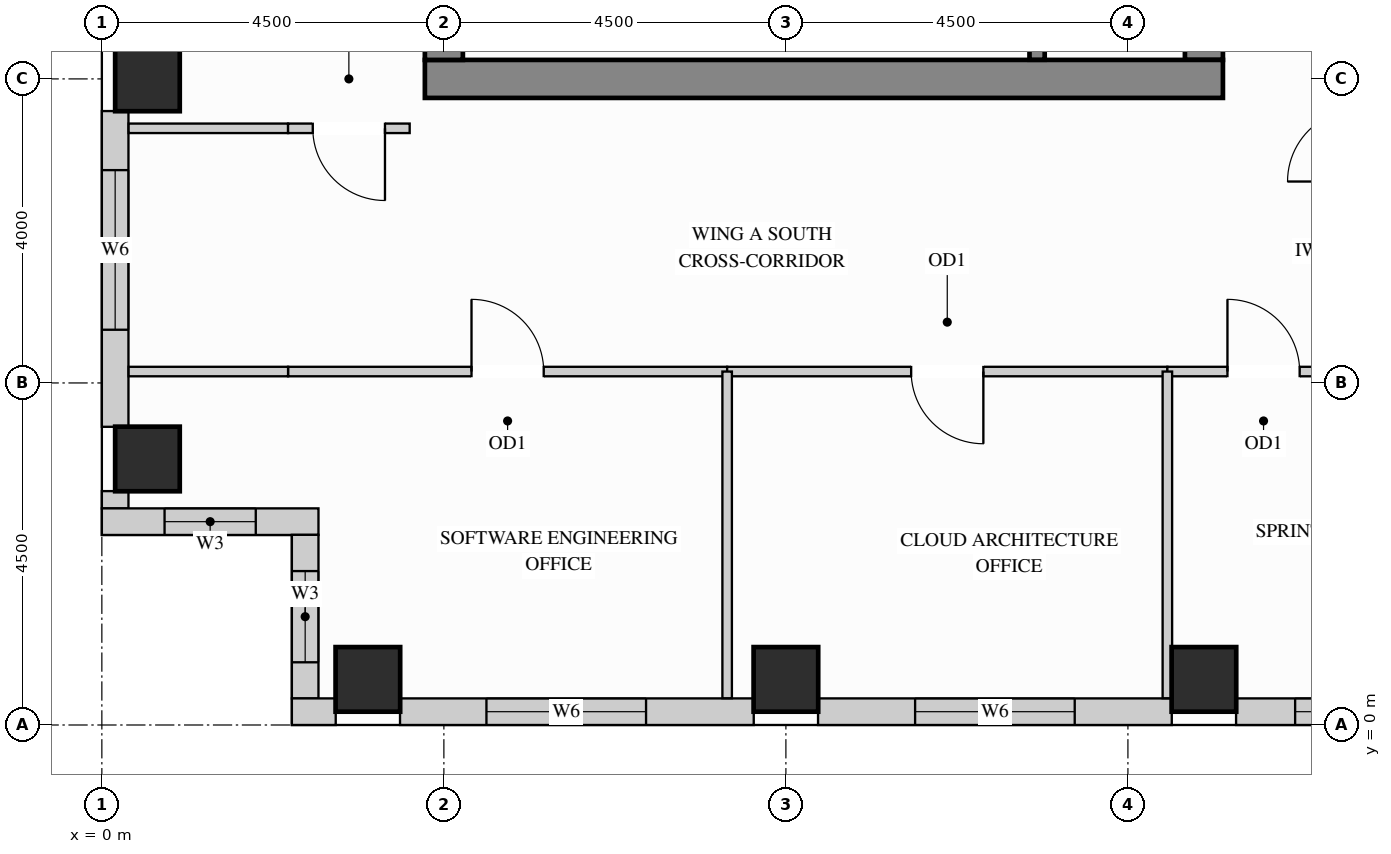
"""IFC4 building model, lengths in metres.
Left out: names, types, materials, properties, quantities, classifications, styles, units other than length and angle.
Written with IfcOpenShell. Run it as: python <this file> out.ifc"""

import sys

from ifc_helpers import new_model, si_unit, direction, frame, frame_2d, origin, origin_2d, place, context, subcontext, project, spatial, rectangle, extrude, source, transform, mapped, element, fill, save


model = new_model("IFC4")
c1 = context("Model", 3, precision=1e-05, world=origin(), true_north=direction((0.0, 1.0)))
c2 = subcontext(c1, "Body", "Model", "MODEL_VIEW")
j1 = project(units=[si_unit("LENGTHUNIT", "METRE"), si_unit("PLANEANGLEUNIT", "RADIAN")], contexts=[c1])
p1 = place(None, origin())
s1 = spatial("IfcSite", under=j1, at=p1, CompositionType="ELEMENT")
p2 = place(p1, origin())
s2 = spatial("IfcBuilding", under=s1, at=p2, CompositionType="ELEMENT")
p3 = place(p2, frame((0.0, 0.0, 255.6)))
s3 = spatial("IfcBuildingStorey", under=s2, at=p3, CompositionType="ELEMENT", Elevation=255.6)
m1 = source(origin(), c2, "Body", "SweptSolid", [
    extrude(rectangle(XDim=0.85, YDim=0.85, at=origin_2d()), origin(), (0.0, 0.0, 1.0), 3.4),
])
for number, where, z_axis, x_axis in (
    (1, (14.5, 0.6, 0.0), (0.0, 0.0, 1.0), (1.0, 0.0, 0.0)),
    (2, (3.5, 0.6, 0.0), (0.0, 0.0, 1.0), (1.0, 0.0, 0.0)),
    (3, (9.0, 0.6, 0.0), (0.0, 0.0, 1.0), (1.0, 0.0, 0.0)),
    (4, (0.6, 3.5, 0.0), (0.0, 0.0, 1.0), (1.0, 0.0, 0.0)),
    (5, (0.6, 8.5, 0.0), (0.0, 0.0, 1.0), (1.0, 0.0, 0.0)),
):
    element("IfcColumn", number, at=place(p3, frame(where, z_axis=z_axis, x_axis=x_axis)), inside=s3, PredefinedType="COLUMN", context=c2, shape_type="MappedRepresentation", body=[
        mapped(m1, transform((0.0, 0.0, 0.0), x_axis=(1.0, 0.0, 0.0), y_axis=(0.0, 1.0, 0.0), z_axis=(0.0, 0.0, 1.0))),
    ])
m2 = source(origin(), c2, "Body", "SweptSolid", [
    extrude(rectangle(XDim=10.07, YDim=0.5, at=frame_2d((5.035, 0.0))), origin(), (0.0, 0.0, 1.0), 3.4),
])
p4 = place(p3, frame((14.5, 8.75, 0.0), z_axis=(0.0, 0.0, 1.0), x_axis=(0.0, 1.0, 0.0)))
e6 = element("IfcWall", 6, at=p4, inside=s3, PredefinedType="SHEAR", context=c2, shape_type="MappedRepresentation", body=[
    mapped(m2, transform((0.0, 0.0, 0.0), x_axis=(1.0, 0.0, 0.0), y_axis=(0.0, 1.0, 0.0), z_axis=(0.0, 0.0, 1.0))),
])
m3 = source(origin(), c2, "Body", "SweptSolid", [
    extrude(rectangle(XDim=10.5, YDim=0.5, at=frame_2d((5.25, 0.0))), origin(), (0.0, 0.0, 1.0), 3.4),
])
p5 = place(p3, frame((4.25, 8.5, 0.0), z_axis=(0.0, 0.0, 1.0), x_axis=(1.0, 0.0, 0.0)))
e7 = element("IfcWall", 7, at=p5, inside=s3, PredefinedType="SHEAR", context=c2, shape_type="MappedRepresentation", body=[
    mapped(m3, transform((0.0, 0.0, 0.0), x_axis=(1.0, 0.0, 0.0), y_axis=(0.0, 1.0, 0.0), z_axis=(0.0, 0.0, 1.0))),
])
m4 = source(origin(), c2, "Body", "SweptSolid", [
    extrude(rectangle(XDim=20.5, YDim=0.5, at=frame_2d((10.25, 0.0))), origin(), (0.0, 0.0, 1.0), 3.4),
])
p6 = place(p3, frame((4.5, 8.75, 0.0), z_axis=(0.0, 0.0, 1.0), x_axis=(0.0, 1.0, 0.0)))
e8 = element("IfcWall", 8, at=p6, inside=s3, PredefinedType="SHEAR", context=c2, shape_type="MappedRepresentation", body=[
    mapped(m4, transform((0.0, 0.0, 0.0), x_axis=(1.0, 0.0, 0.0), y_axis=(0.0, 1.0, 0.0), z_axis=(0.0, 0.0, 1.0))),
])
p7 = place(p3, frame((0.175, 8.077, 0.0), z_axis=(0.0, 0.0, 1.0), x_axis=(0.0, -1.0, 0.0)))
e9 = element("IfcWall", 9, at=p7, inside=s3, PredefinedType="SOLIDWALL", context=c2, shape_type="SweptSolid", body=[
    extrude(rectangle(XDim=4.154, YDim=0.35, at=frame_2d((2.077, 0.0))), origin(), (0.0, 0.0, 1.0), 3.385),
])
p8 = place(p7, frame((0.777, 0.0, 0.78)))
e10 = element("IfcOpeningElement", 10, at=p8, cuts=e9, PredefinedType="OPENING", context=c2, shape_type="SweptSolid", body=[
    extrude(rectangle(XDim=2.1, YDim=2.25, at=frame_2d((1.05, 1.125))), frame((0.0, 0.185, 0.0), z_axis=(0.0, -1.0, 0.0), x_axis=(1.0, 0.0, 0.0)), (0.0, 0.0, 1.0), 0.37),
])
m5 = source(origin(), c2, "Body", "SweptSolid", [
    extrude(rectangle(XDim=0.229, YDim=0.35, at=frame_2d((0.115, 0.0))), origin(), (0.0, 0.0, 1.0), 3.385),
])
p9 = place(p3, frame((0.175, 3.077, 0.0), z_axis=(0.0, 0.0, 1.0), x_axis=(0.0, -1.0, 0.0)))
e11 = element("IfcWall", 11, at=p9, inside=s3, PredefinedType="SOLIDWALL", context=c2, shape_type="MappedRepresentation", body=[
    mapped(m5, transform((0.0, 0.0, 0.0), x_axis=(1.0, 0.0, 0.0), y_axis=(0.0, 1.0, 0.0), z_axis=(0.0, 0.0, 1.0))),
])
p10 = place(p3, frame((0.0, 2.675, 0.0), z_axis=(0.0, 0.0, 1.0), x_axis=(1.0, 0.0, 0.0)))
e12 = element("IfcWall", 12, at=p10, inside=s3, PredefinedType="SOLIDWALL", context=c2, shape_type="SweptSolid", body=[
    extrude(rectangle(XDim=2.85, YDim=0.35, at=frame_2d((1.425, 0.0))), origin(), (0.0, 0.0, 1.0), 3.385),
])
p11 = place(p10, frame((0.825, 0.0, 0.78)))
e13 = element("IfcOpeningElement", 13, at=p11, cuts=e12, PredefinedType="OPENING", context=c2, shape_type="SweptSolid", body=[
    extrude(rectangle(XDim=1.2, YDim=2.25, at=frame_2d((0.6, 1.125))), frame((0.0, 0.185, 0.0), z_axis=(0.0, -1.0, 0.0), x_axis=(1.0, 0.0, 0.0)), (0.0, 0.0, 1.0), 0.37),
])
p12 = place(p3, frame((2.675, 2.502, 0.0), z_axis=(0.0, 0.0, 1.0), x_axis=(0.0, -1.0, 0.0)))
e14 = element("IfcWall", 14, at=p12, inside=s3, PredefinedType="SOLIDWALL", context=c2, shape_type="SweptSolid", body=[
    extrude(rectangle(XDim=2.154, YDim=0.35, at=frame_2d((1.077, 0.0))), origin(), (0.0, 0.0, 1.0), 3.385),
])
p13 = place(p12, frame((0.477, 0.0, 0.78)))
e15 = element("IfcOpeningElement", 15, at=p13, cuts=e14, PredefinedType="OPENING", context=c2, shape_type="SweptSolid", body=[
    extrude(rectangle(XDim=1.2, YDim=2.25, at=frame_2d((0.6, 1.125))), frame((0.0, 0.185, 0.0), z_axis=(0.0, -1.0, 0.0), x_axis=(1.0, 0.0, 0.0)), (0.0, 0.0, 1.0), 0.37),
])
m6 = source(origin(), c2, "Body", "SweptSolid", [
    extrude(rectangle(XDim=0.577, YDim=0.35, at=frame_2d((0.289, 0.0))), origin(), (0.0, 0.0, 1.0), 3.385),
])
p14 = place(p3, frame((2.5, 0.175, 0.0), z_axis=(0.0, 0.0, 1.0), x_axis=(1.0, 0.0, 0.0)))
e16 = element("IfcWall", 16, at=p14, inside=s3, PredefinedType="SOLIDWALL", context=c2, shape_type="MappedRepresentation", body=[
    mapped(m6, transform((0.0, 0.0, 0.0), x_axis=(1.0, 0.0, 0.0), y_axis=(0.0, 1.0, 0.0), z_axis=(0.0, 0.0, 1.0))),
])
p15 = place(p3, frame((3.923, 0.175, 0.0), z_axis=(0.0, 0.0, 1.0), x_axis=(1.0, 0.0, 0.0)))
e17 = element("IfcWall", 17, at=p15, inside=s3, PredefinedType="SOLIDWALL", context=c2, shape_type="SweptSolid", body=[
    extrude(rectangle(XDim=4.654, YDim=0.35, at=frame_2d((2.327, 0.0))), origin(), (0.0, 0.0, 1.0), 3.385),
])
p16 = place(p15, frame((1.137, 0.0, 0.78)))
e18 = element("IfcOpeningElement", 18, at=p16, cuts=e17, PredefinedType="OPENING", context=c2, shape_type="SweptSolid", body=[
    extrude(rectangle(XDim=2.1, YDim=2.25, at=frame_2d((1.05, 1.125))), frame((0.0, 0.185, 0.0), z_axis=(0.0, -1.0, 0.0), x_axis=(1.0, 0.0, 0.0)), (0.0, 0.0, 1.0), 0.37),
])
p17 = place(p3, frame((9.423, 0.175, 0.0), z_axis=(0.0, 0.0, 1.0), x_axis=(1.0, 0.0, 0.0)))
e19 = element("IfcWall", 19, at=p17, inside=s3, PredefinedType="SOLIDWALL", context=c2, shape_type="SweptSolid", body=[
    extrude(rectangle(XDim=4.654, YDim=0.35, at=frame_2d((2.327, 0.0))), origin(), (0.0, 0.0, 1.0), 3.385),
])
p18 = place(p17, frame((1.277, 0.0, 0.78)))
e20 = element("IfcOpeningElement", 20, at=p18, cuts=e19, PredefinedType="OPENING", context=c2, shape_type="SweptSolid", body=[
    extrude(rectangle(XDim=2.1, YDim=2.25, at=frame_2d((1.05, 1.125))), frame((0.0, 0.185, 0.0), z_axis=(0.0, -1.0, 0.0), x_axis=(1.0, 0.0, 0.0)), (0.0, 0.0, 1.0), 0.37),
])
p19 = place(p3, frame((14.923, 0.175, 0.0), z_axis=(0.0, 0.0, 1.0), x_axis=(1.0, 0.0, 0.0)))
e21 = element("IfcWall", 21, at=p19, inside=s3, PredefinedType="SOLIDWALL", context=c2, shape_type="SweptSolid", body=[
    extrude(rectangle(XDim=3.654, YDim=0.35, at=frame_2d((1.827, 0.0))), origin(), (0.0, 0.0, 1.0), 3.385),
])
p20 = place(p19, frame((0.777, 0.0, 0.78)))
e22 = element("IfcOpeningElement", 22, at=p20, cuts=e21, PredefinedType="OPENING", context=c2, shape_type="SweptSolid", body=[
    extrude(rectangle(XDim=2.1, YDim=2.25, at=frame_2d((1.05, 1.125))), frame((0.0, 0.185, 0.0), z_axis=(0.0, -1.0, 0.0), x_axis=(1.0, 0.0, 0.0)), (0.0, 0.0, 1.0), 0.37),
])
m7 = source(origin(), c2, "Body", "SweptSolid", [
    extrude(rectangle(XDim=2.098, YDim=0.125, at=frame_2d((1.049, 0.0))), origin(), (0.0, 0.0, 1.0), 3.385),
])
p21 = place(p3, frame((0.352, 7.85, 0.0), z_axis=(0.0, 0.0, 1.0), x_axis=(1.0, 0.0, 0.0)))
e23 = element("IfcWall", 23, at=p21, inside=s3, PredefinedType="PARTITIONING", context=c2, shape_type="MappedRepresentation", body=[
    mapped(m7, transform((0.0, 0.0, 0.0), x_axis=(1.0, 0.0, 0.0), y_axis=(0.0, 1.0, 0.0), z_axis=(0.0, 0.0, 1.0))),
])
p22 = place(p3, frame((2.45, 7.85, 0.0), z_axis=(0.0, 0.0, 1.0), x_axis=(1.0, 0.0, 0.0)))
e24 = element("IfcWall", 24, at=p22, inside=s3, PredefinedType="PARTITIONING", context=c2, shape_type="SweptSolid", body=[
    extrude(rectangle(XDim=1.6, YDim=0.125, at=frame_2d((0.8, 0.0))), origin(), (0.0, 0.0, 1.0), 3.385),
])
p23 = place(p22, frame((0.325, 0.0, 0.0)))
e25 = element("IfcOpeningElement", 25, at=p23, cuts=e24, PredefinedType="OPENING", context=c2, shape_type="SweptSolid", body=[
    extrude(rectangle(XDim=0.95, YDim=2.15, at=frame_2d((0.475, 1.075))), frame((0.0, 0.073, 0.0), z_axis=(0.0, -1.0, 0.0), x_axis=(1.0, 0.0, 0.0)), (0.0, 0.0, 1.0), 0.145),
])
p24 = place(p3, frame((2.45, 4.65, 0.0), z_axis=(0.0, 0.0, 1.0), x_axis=(1.0, 0.0, 0.0)))
e26 = element("IfcWall", 26, at=p24, inside=s3, PredefinedType="PARTITIONING", context=c2, shape_type="SweptSolid", body=[
    extrude(rectangle(XDim=5.777, YDim=0.125, at=frame_2d((2.889, 0.0))), origin(), (0.0, 0.0, 1.0), 2.848),
])
p25 = place(p24, frame((2.414, 0.0, 0.0)))
e27 = element("IfcOpeningElement", 27, at=p25, cuts=e26, PredefinedType="OPENING", context=c2, shape_type="SweptSolid", body=[
    extrude(rectangle(XDim=0.95, YDim=2.15, at=frame_2d((0.475, 1.075))), frame((0.0, 0.073, 0.0), z_axis=(0.0, -1.0, 0.0), x_axis=(1.0, 0.0, 0.0)), (0.0, 0.0, 1.0), 0.145),
])
p26 = place(p3, frame((8.227, 4.65, 0.0), z_axis=(0.0, 0.0, 1.0), x_axis=(1.0, 0.0, 0.0)))
e28 = element("IfcWall", 28, at=p26, inside=s3, PredefinedType="PARTITIONING", context=c2, shape_type="SweptSolid", body=[
    extrude(rectangle(XDim=5.792, YDim=0.125, at=frame_2d((2.896, 0.0))), origin(), (0.0, 0.0, 1.0), 2.848),
])
p27 = place(p26, frame((2.421, 0.0, 0.0)))
e29 = element("IfcOpeningElement", 29, at=p27, cuts=e28, PredefinedType="OPENING", context=c2, shape_type="SweptSolid", body=[
    extrude(rectangle(XDim=0.95, YDim=2.15, at=frame_2d((0.475, 1.075))), frame((0.0, 0.073, 0.0), z_axis=(0.0, -1.0, 0.0), x_axis=(1.0, 0.0, 0.0)), (0.0, 0.0, 1.0), 0.145),
])
p28 = place(p3, frame((14.019, 4.65, 0.0), z_axis=(0.0, 0.0, 1.0), x_axis=(1.0, 0.0, 0.0)))
e30 = element("IfcWall", 30, at=p28, inside=s3, PredefinedType="PARTITIONING", context=c2, shape_type="SweptSolid", body=[
    extrude(rectangle(XDim=2.531, YDim=0.125, at=frame_2d((1.266, 0.0))), origin(), (0.0, 0.0, 1.0), 2.848),
])
p29 = place(p28, frame((0.791, 0.0, 0.0)))
e31 = element("IfcOpeningElement", 31, at=p29, cuts=e30, PredefinedType="OPENING", context=c2, shape_type="SweptSolid", body=[
    extrude(rectangle(XDim=0.95, YDim=2.15, at=frame_2d((0.475, 1.075))), frame((0.0, 0.073, 0.0), z_axis=(0.0, -1.0, 0.0), x_axis=(1.0, 0.0, 0.0)), (0.0, 0.0, 1.0), 0.145),
])
m8 = source(origin(), c2, "Body", "SweptSolid", [
    extrude(rectangle(XDim=2.098, YDim=0.125, at=frame_2d((1.049, 0.0))), origin(), (0.0, 0.0, 1.0), 2.848),
])
p30 = place(p3, frame((0.352, 4.65, 0.0), z_axis=(0.0, 0.0, 1.0), x_axis=(1.0, 0.0, 0.0)))
e32 = element("IfcWall", 32, at=p30, inside=s3, PredefinedType="PARTITIONING", context=c2, shape_type="MappedRepresentation", body=[
    mapped(m8, transform((0.0, 0.0, 0.0), x_axis=(1.0, 0.0, 0.0), y_axis=(0.0, 1.0, 0.0), z_axis=(0.0, 0.0, 1.0))),
])
m9 = source(origin(), c2, "Body", "SweptSolid", [
    extrude(rectangle(XDim=4.298, YDim=0.125, at=frame_2d((2.149, 0.0))), origin(), (0.0, 0.0, 1.0), 3.385),
])
for number, where, z_axis, x_axis in (
    (33, (8.227, 0.352, 0.0), (0.0, 0.0, 1.0), (0.0, 1.0, 0.0)),
    (34, (14.019, 0.352, 0.0), (0.0, 0.0, 1.0), (0.0, 1.0, 0.0)),
):
    element("IfcWall", number, at=place(p3, frame(where, z_axis=z_axis, x_axis=x_axis)), inside=s3, PredefinedType="PARTITIONING", context=c2, shape_type="MappedRepresentation", body=[
        mapped(m9, transform((0.0, 0.0, 0.0), x_axis=(1.0, 0.0, 0.0), y_axis=(0.0, 1.0, 0.0), z_axis=(0.0, 0.0, 1.0))),
    ])
m10 = source(origin(), c2, "Body", "SweptSolid", [
    extrude(rectangle(XDim=3.803, YDim=0.2, at=frame_2d((1.901, 0.0))), origin(), (0.0, 0.0, 1.0), 3.4),
])
p31 = place(p3, frame((12.305, 8.752, 0.0), z_axis=(0.0, 0.0, 1.0), x_axis=(0.0, 1.0, 0.0)))
e35 = element("IfcWall", 35, at=p31, inside=s3, PredefinedType="SHEAR", context=c2, shape_type="MappedRepresentation", body=[
    mapped(m10, transform((0.0, 0.0, 0.0), x_axis=(1.0, 0.0, 0.0), y_axis=(0.0, 1.0, 0.0), z_axis=(0.0, 0.0, 1.0))),
])
m11 = source(origin(), c2, "Body", "SweptSolid", [
    extrude(rectangle(XDim=0.95, YDim=2.15, at=frame_2d((0.475, 1.075))), frame((0.0, 0.025, 0.0), z_axis=(0.0, -1.0, 0.0), x_axis=(1.0, 0.0, 0.0)), (0.0, 0.0, 1.0), 0.05),
])
p32 = place(p25, origin())
e36 = element("IfcDoor", 36, at=p32, inside=s3, OperationType="SINGLE_SWING_LEFT", PredefinedType="DOOR", context=c2, shape_type="MappedRepresentation", body=[
    mapped(m11, transform((0.0, 0.0, 0.0), x_axis=(1.0, 0.0, 0.0), y_axis=(0.0, 1.0, 0.0), z_axis=(0.0, 0.0, 1.0))),
])
fill(e27, e36)
p33 = place(p27, origin())
e37 = element("IfcDoor", 37, at=p33, inside=s3, OperationType="SINGLE_SWING_RIGHT", PredefinedType="DOOR", context=c2, shape_type="MappedRepresentation", body=[
    mapped(m11, transform((0.0, 0.0, 0.0), x_axis=(1.0, 0.0, 0.0), y_axis=(0.0, 1.0, 0.0), z_axis=(0.0, 0.0, 1.0))),
])
fill(e29, e37)
p34 = place(p29, origin())
e38 = element("IfcDoor", 38, at=p34, inside=s3, OperationType="SINGLE_SWING_LEFT", PredefinedType="DOOR", context=c2, shape_type="MappedRepresentation", body=[
    mapped(m11, transform((0.0, 0.0, 0.0), x_axis=(1.0, 0.0, 0.0), y_axis=(0.0, 1.0, 0.0), z_axis=(0.0, 0.0, 1.0))),
])
fill(e31, e38)
p35 = place(p23, origin())
e39 = element("IfcDoor", 39, at=p35, inside=s3, OperationType="SINGLE_SWING_RIGHT", PredefinedType="DOOR", context=c2, shape_type="MappedRepresentation", body=[
    mapped(m11, transform((0.0, 0.0, 0.0), x_axis=(1.0, 0.0, 0.0), y_axis=(0.0, 1.0, 0.0), z_axis=(0.0, 0.0, 1.0))),
])
fill(e25, e39)
m12 = source(origin(), c2, "Body", "SweptSolid", [
    extrude(rectangle(XDim=1.2, YDim=2.25, at=frame_2d((0.6, 1.125))), frame((0.0, 0.03, 0.0), z_axis=(0.0, -1.0, 0.0), x_axis=(1.0, 0.0, 0.0)), (0.0, 0.0, 1.0), 0.06),
])
p36 = place(p11, origin())
e40 = element("IfcWindow", 40, at=p36, inside=s3, PartitioningType="SINGLE_PANEL", PredefinedType="WINDOW", context=c2, shape_type="MappedRepresentation", body=[
    mapped(m12, transform((0.0, 0.0, 0.0), x_axis=(1.0, 0.0, 0.0), y_axis=(0.0, 1.0, 0.0), z_axis=(0.0, 0.0, 1.0))),
])
fill(e13, e40)
p37 = place(p13, origin())
e41 = element("IfcWindow", 41, at=p37, inside=s3, PartitioningType="SINGLE_PANEL", PredefinedType="WINDOW", context=c2, shape_type="MappedRepresentation", body=[
    mapped(m12, transform((0.0, 0.0, 0.0), x_axis=(1.0, 0.0, 0.0), y_axis=(0.0, 1.0, 0.0), z_axis=(0.0, 0.0, 1.0))),
])
fill(e15, e41)
m13 = source(origin(), c2, "Body", "SweptSolid", [
    extrude(rectangle(XDim=2.1, YDim=2.25, at=frame_2d((1.05, 1.125))), frame((0.0, 0.03, 0.0), z_axis=(0.0, -1.0, 0.0), x_axis=(1.0, 0.0, 0.0)), (0.0, 0.0, 1.0), 0.06),
])
p38 = place(p8, origin())
e42 = element("IfcWindow", 42, at=p38, inside=s3, PartitioningType="SINGLE_PANEL", PredefinedType="WINDOW", context=c2, shape_type="MappedRepresentation", body=[
    mapped(m13, transform((0.0, 0.0, 0.0), x_axis=(1.0, 0.0, 0.0), y_axis=(0.0, 1.0, 0.0), z_axis=(0.0, 0.0, 1.0))),
])
fill(e10, e42)
p39 = place(p16, origin())
e43 = element("IfcWindow", 43, at=p39, inside=s3, PartitioningType="SINGLE_PANEL", PredefinedType="WINDOW", context=c2, shape_type="MappedRepresentation", body=[
    mapped(m13, transform((0.0, 0.0, 0.0), x_axis=(1.0, 0.0, 0.0), y_axis=(0.0, 1.0, 0.0), z_axis=(0.0, 0.0, 1.0))),
])
fill(e18, e43)
p40 = place(p18, origin())
e44 = element("IfcWindow", 44, at=p40, inside=s3, PartitioningType="SINGLE_PANEL", PredefinedType="WINDOW", context=c2, shape_type="MappedRepresentation", body=[
    mapped(m13, transform((0.0, 0.0, 0.0), x_axis=(1.0, 0.0, 0.0), y_axis=(0.0, 1.0, 0.0), z_axis=(0.0, 0.0, 1.0))),
])
fill(e20, e44)
p41 = place(p20, origin())
e45 = element("IfcWindow", 45, at=p41, inside=s3, PartitioningType="SINGLE_PANEL", PredefinedType="WINDOW", context=c2, shape_type="MappedRepresentation", body=[
    mapped(m13, transform((0.0, 0.0, 0.0), x_axis=(1.0, 0.0, 0.0), y_axis=(0.0, 1.0, 0.0), z_axis=(0.0, 0.0, 1.0))),
])
fill(e22, e45)
save(model, sys.argv[1])
